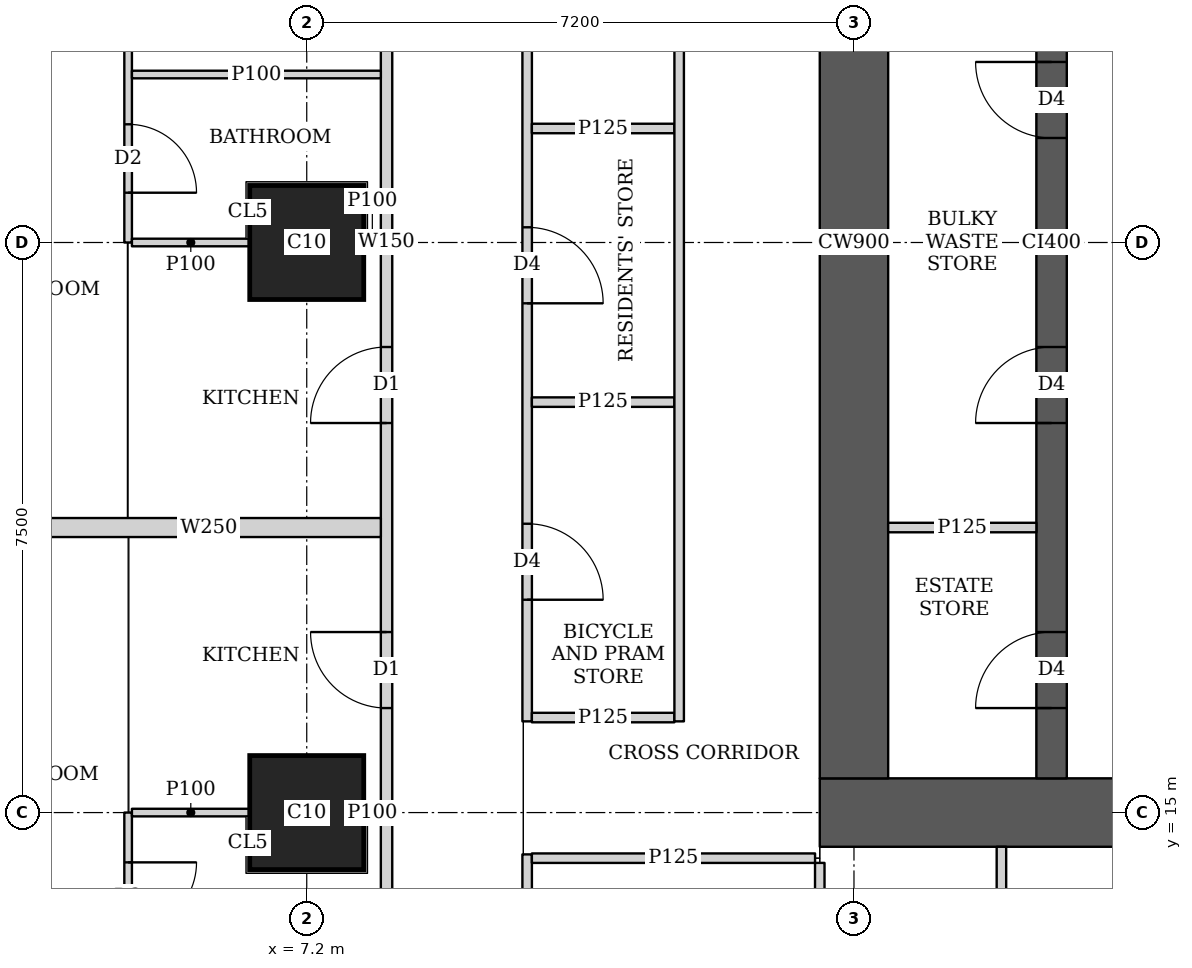
"""IFC4 building model, lengths in metres.
Left out: names, types, materials, properties, quantities, classifications, styles, units other than length and angle.
Written with IfcOpenShell. Run it as: python <this file> out.ifc"""

import sys

from ifc_helpers import new_model, si_unit, direction, frame, frame_2d, origin, origin_2d, place, context, subcontext, project, spatial, rectangle, extrude, element, fill, save


model = new_model("IFC4")
c1 = context("Model", 3, precision=1e-05, world=origin(), true_north=direction((0.0, 1.0)))
c2 = subcontext(c1, "Body", "Model", "MODEL_VIEW")
j1 = project(units=[si_unit("LENGTHUNIT", "METRE"), si_unit("PLANEANGLEUNIT", "RADIAN")], contexts=[c1])
p1 = place(None, origin())
s1 = spatial("IfcSite", under=j1, at=p1, CompositionType="ELEMENT")
p2 = place(p1, origin())
s2 = spatial("IfcBuilding", under=s1, at=p2, CompositionType="ELEMENT")
p3 = place(p2, frame((0.0, 0.0, 147.05)))
s3 = spatial("IfcBuildingStorey", under=s2, at=p3, CompositionType="ELEMENT", Elevation=147.05)
for number, where, z_axis, x_axis in (
    (1, (7.2, 15.0, 0.0), (0.0, 0.0, 1.0), (1.0, 0.0, 0.0)),
    (2, (7.2, 22.5, 0.0), (0.0, 0.0, 1.0), (1.0, 0.0, 0.0)),
):
    element("IfcColumn", number, at=place(p3, frame(where, z_axis=z_axis, x_axis=x_axis)), inside=s3, PredefinedType="COLUMN", context=c2, shape_type="SweptSolid", body=[
        extrude(rectangle(XDim=1.5, YDim=1.5, at=origin_2d()), origin(), (0.0, 0.0, 1.0), 3.75),
    ])
p4 = place(p3, frame((13.95, 15.0, 0.0), z_axis=(0.0, 0.0, 1.0), x_axis=(1.0, 0.0, 0.0)))
e3 = element("IfcWall", 3, at=p4, inside=s3, PredefinedType="SHEAR", context=c2, shape_type="SweptSolid", body=[
    extrude(rectangle(XDim=15.3, YDim=0.9, at=frame_2d((7.65, 0.0))), origin(), (0.0, 0.0, 1.0), 3.75),
])
p5 = place(p4, frame((4.45, 0.0, 0.0)))
e4 = element("IfcOpeningElement", 4, at=p5, cuts=e3, PredefinedType="OPENING", context=c2, shape_type="SweptSolid", body=[
    extrude(rectangle(XDim=1.8, YDim=2.1, at=frame_2d((0.9, 1.05))), frame((0.0, 0.46, 0.0), z_axis=(0.0, -1.0, 0.0), x_axis=(1.0, 0.0, 0.0)), (0.0, 0.0, 1.0), 0.92),
])
p6 = place(p4, frame((10.7, 0.0, 0.0)))
e5 = element("IfcOpeningElement", 5, at=p6, cuts=e3, PredefinedType="OPENING", context=c2, shape_type="SweptSolid", body=[
    extrude(rectangle(XDim=1.1, YDim=2.1, at=frame_2d((0.55, 1.05))), frame((0.0, 0.46, 0.0), z_axis=(0.0, -1.0, 0.0), x_axis=(1.0, 0.0, 0.0)), (0.0, 0.0, 1.0), 0.92),
])
p7 = place(p3, frame((14.4, 15.45, 0.0), z_axis=(0.0, 0.0, 1.0), x_axis=(0.0, 1.0, 0.0)))
e6 = element("IfcWall", 6, at=p7, inside=s3, PredefinedType="SHEAR", context=c2, shape_type="SweptSolid", body=[
    extrude(rectangle(XDim=14.1, YDim=0.9, at=frame_2d((7.05, 0.0))), origin(), (0.0, 0.0, 1.0), 3.75),
])
p8 = place(p3, frame((17.0, 15.45, 0.0), z_axis=(0.0, 0.0, 1.0), x_axis=(0.0, 1.0, 0.0)))
e7 = element("IfcWall", 7, at=p8, inside=s3, PredefinedType="SHEAR", context=c2, shape_type="SweptSolid", body=[
    extrude(rectangle(XDim=14.1, YDim=0.4, at=frame_2d((7.05, 0.0))), origin(), (0.0, 0.0, 1.0), 3.75),
])
p9 = place(p8, frame((0.925, 0.0, 0.0)))
e8 = element("IfcOpeningElement", 8, at=p9, cuts=e7, PredefinedType="OPENING", context=c2, shape_type="SweptSolid", body=[
    extrude(rectangle(XDim=1.0, YDim=2.1, at=frame_2d((0.5, 1.05))), frame((0.0, 0.21, 0.0), z_axis=(0.0, -1.0, 0.0), x_axis=(1.0, 0.0, 0.0)), (0.0, 0.0, 1.0), 0.42),
])
p10 = place(p8, frame((4.675, 0.0, 0.0)))
e9 = element("IfcOpeningElement", 9, at=p10, cuts=e7, PredefinedType="OPENING", context=c2, shape_type="SweptSolid", body=[
    extrude(rectangle(XDim=1.0, YDim=2.1, at=frame_2d((0.5, 1.05))), frame((0.0, 0.21, 0.0), z_axis=(0.0, -1.0, 0.0), x_axis=(1.0, 0.0, 0.0)), (0.0, 0.0, 1.0), 0.42),
])
p11 = place(p8, frame((8.425, 0.0, 0.0)))
e10 = element("IfcOpeningElement", 10, at=p11, cuts=e7, PredefinedType="OPENING", context=c2, shape_type="SweptSolid", body=[
    extrude(rectangle(XDim=1.0, YDim=2.1, at=frame_2d((0.5, 1.05))), frame((0.0, 0.21, 0.0), z_axis=(0.0, -1.0, 0.0), x_axis=(1.0, 0.0, 0.0)), (0.0, 0.0, 1.0), 0.42),
])
p12 = place(p8, frame((12.175, 0.0, 0.0)))
e11 = element("IfcOpeningElement", 11, at=p12, cuts=e7, PredefinedType="OPENING", context=c2, shape_type="SweptSolid", body=[
    extrude(rectangle(XDim=1.0, YDim=2.1, at=frame_2d((0.5, 1.05))), frame((0.0, 0.21, 0.0), z_axis=(0.0, -1.0, 0.0), x_axis=(1.0, 0.0, 0.0)), (0.0, 0.0, 1.0), 0.42),
])
p13 = place(p3, frame((8.25, 1.957, 0.0), z_axis=(0.0, 0.0, 1.0), x_axis=(0.0, 1.0, 0.0)))
e12 = element("IfcWall", 12, at=p13, inside=s3, PredefinedType="SOLIDWALL", context=c2, shape_type="SweptSolid", body=[
    extrude(rectangle(XDim=41.111, YDim=0.15, at=frame_2d((20.556, 0.0))), origin(), (0.0, 0.0, 1.0), 3.5),
])
p14 = place(p13, frame((14.418, 0.0, 0.0)))
e13 = element("IfcOpeningElement", 13, at=p14, cuts=e12, PredefinedType="OPENING", context=c2, shape_type="SweptSolid", body=[
    extrude(rectangle(XDim=1.0, YDim=2.1, at=frame_2d((0.5, 1.05))), frame((0.0, 0.085, 0.0), z_axis=(0.0, -1.0, 0.0), x_axis=(1.0, 0.0, 0.0)), (0.0, 0.0, 1.0), 0.17),
])
p15 = place(p13, frame((18.168, 0.0, 0.0)))
e14 = element("IfcOpeningElement", 14, at=p15, cuts=e12, PredefinedType="OPENING", context=c2, shape_type="SweptSolid", body=[
    extrude(rectangle(XDim=1.0, YDim=2.1, at=frame_2d((0.5, 1.05))), frame((0.0, 0.085, 0.0), z_axis=(0.0, -1.0, 0.0), x_axis=(1.0, 0.0, 0.0)), (0.0, 0.0, 1.0), 0.17),
])
p16 = place(p13, frame((33.168, 0.0, 0.0)))
e15 = element("IfcOpeningElement", 15, at=p16, cuts=e12, PredefinedType="OPENING", context=c2, shape_type="SweptSolid", body=[
    extrude(rectangle(XDim=1.0, YDim=2.1, at=frame_2d((0.5, 1.05))), frame((0.0, 0.085, 0.0), z_axis=(0.0, -1.0, 0.0), x_axis=(1.0, 0.0, 0.0)), (0.0, 0.0, 1.0), 0.17),
])
p17 = place(p3, frame((4.85, 2.505, 0.0), z_axis=(0.0, 0.0, 1.0), x_axis=(0.0, 1.0, 0.0)))
e16 = element("IfcWall", 16, at=p17, inside=s3, PredefinedType="PARTITIONING", context=c2, shape_type="SweptSolid", body=[
    extrude(rectangle(XDim=12.495, YDim=0.1, at=frame_2d((6.248, 0.0))), origin(), (0.0, 0.0, 1.0), 3.5),
])
p18 = place(p17, frame((10.94, 0.0, 0.0)))
e17 = element("IfcOpeningElement", 17, at=p18, cuts=e16, PredefinedType="OPENING", context=c2, shape_type="SweptSolid", body=[
    extrude(rectangle(XDim=0.9, YDim=2.1, at=frame_2d((0.45, 1.05))), frame((0.0, 0.06, 0.0), z_axis=(0.0, -1.0, 0.0), x_axis=(1.0, 0.0, 0.0)), (0.0, 0.0, 1.0), 0.12),
])
p19 = place(p17, frame((7.495, 0.0, 0.0)))
e18 = element("IfcOpeningElement", 18, at=p19, cuts=e16, PredefinedType="OPENING", context=c2, shape_type="SweptSolid", body=[
    extrude(rectangle(XDim=0.9, YDim=2.1, at=frame_2d((0.45, 1.05))), frame((0.0, 0.06, 0.0), z_axis=(0.0, -1.0, 0.0), x_axis=(1.0, 0.0, 0.0)), (0.0, 0.0, 1.0), 0.12),
])
p20 = place(p17, frame((3.635, 0.0, 0.0)))
e19 = element("IfcOpeningElement", 19, at=p20, cuts=e16, PredefinedType="OPENING", context=c2, shape_type="SweptSolid", body=[
    extrude(rectangle(XDim=0.9, YDim=2.1, at=frame_2d((0.45, 1.05))), frame((0.0, 0.06, 0.0), z_axis=(0.0, -1.0, 0.0), x_axis=(1.0, 0.0, 0.0)), (0.0, 0.0, 1.0), 0.12),
])
p21 = place(p17, frame((9.065, 0.0, 0.0)))
e20 = element("IfcOpeningElement", 20, at=p21, cuts=e16, PredefinedType="OPENING", context=c2, shape_type="SweptSolid", body=[
    extrude(rectangle(XDim=0.9, YDim=2.1, at=frame_2d((0.45, 1.05))), frame((0.0, 0.06, 0.0), z_axis=(0.0, -1.0, 0.0), x_axis=(1.0, 0.0, 0.0)), (0.0, 0.0, 1.0), 0.12),
])
p22 = place(p17, frame((5.62, 0.0, 0.0)))
e21 = element("IfcOpeningElement", 21, at=p22, cuts=e16, PredefinedType="OPENING", context=c2, shape_type="SweptSolid", body=[
    extrude(rectangle(XDim=0.9, YDim=2.1, at=frame_2d((0.45, 1.05))), frame((0.0, 0.06, 0.0), z_axis=(0.0, -1.0, 0.0), x_axis=(1.0, 0.0, 0.0)), (0.0, 0.0, 1.0), 0.12),
])
p23 = place(p17, frame((1.76, 0.0, 0.0)))
e22 = element("IfcOpeningElement", 22, at=p23, cuts=e16, PredefinedType="OPENING", context=c2, shape_type="SweptSolid", body=[
    extrude(rectangle(XDim=0.9, YDim=2.1, at=frame_2d((0.45, 1.05))), frame((0.0, 0.06, 0.0), z_axis=(0.0, -1.0, 0.0), x_axis=(1.0, 0.0, 0.0)), (0.0, 0.0, 1.0), 0.12),
])
p24 = place(p3, frame((4.9, 15.0, 0.0), z_axis=(0.0, 0.0, 1.0), x_axis=(1.0, 0.0, 0.0)))
e23 = element("IfcWall", 23, at=p24, inside=s3, PredefinedType="PARTITIONING", context=c2, shape_type="SweptSolid", body=[
    extrude(rectangle(XDim=1.549, YDim=0.1, at=frame_2d((0.774, 0.0))), origin(), (0.0, 0.0, 1.0), 3.5),
])
p25 = place(p3, frame((7.951, 15.0, 0.0), z_axis=(0.0, 0.0, 1.0), x_axis=(1.0, 0.0, 0.0)))
e24 = element("IfcWall", 24, at=p25, inside=s3, PredefinedType="PARTITIONING", context=c2, shape_type="SweptSolid", body=[
    extrude(rectangle(XDim=0.224, YDim=0.1, at=frame_2d((0.112, 0.0))), origin(), (0.0, 0.0, 1.0), 3.5),
])
p26 = place(p3, frame((4.85, 22.5, 0.0), z_axis=(0.0, 0.0, 1.0), x_axis=(0.0, 1.0, 0.0)))
e25 = element("IfcWall", 25, at=p26, inside=s3, PredefinedType="PARTITIONING", context=c2, shape_type="SweptSolid", body=[
    extrude(rectangle(XDim=11.125, YDim=0.1, at=frame_2d((5.562, 0.0))), origin(), (0.0, 0.0, 1.0), 3.5),
])
p27 = place(p26, frame((0.655, 0.0, 0.0)))
e26 = element("IfcOpeningElement", 26, at=p27, cuts=e25, PredefinedType="OPENING", context=c2, shape_type="SweptSolid", body=[
    extrude(rectangle(XDim=0.9, YDim=2.1, at=frame_2d((0.45, 1.05))), frame((0.0, 0.06, 0.0), z_axis=(0.0, -1.0, 0.0), x_axis=(1.0, 0.0, 0.0)), (0.0, 0.0, 1.0), 0.12),
])
p28 = place(p26, frame((4.1, 0.0, 0.0)))
e27 = element("IfcOpeningElement", 27, at=p28, cuts=e25, PredefinedType="OPENING", context=c2, shape_type="SweptSolid", body=[
    extrude(rectangle(XDim=0.9, YDim=2.1, at=frame_2d((0.45, 1.05))), frame((0.0, 0.06, 0.0), z_axis=(0.0, -1.0, 0.0), x_axis=(1.0, 0.0, 0.0)), (0.0, 0.0, 1.0), 0.12),
])
p29 = place(p26, frame((7.96, 0.0, 0.0)))
e28 = element("IfcOpeningElement", 28, at=p29, cuts=e25, PredefinedType="OPENING", context=c2, shape_type="SweptSolid", body=[
    extrude(rectangle(XDim=0.9, YDim=2.1, at=frame_2d((0.45, 1.05))), frame((0.0, 0.06, 0.0), z_axis=(0.0, -1.0, 0.0), x_axis=(1.0, 0.0, 0.0)), (0.0, 0.0, 1.0), 0.12),
])
p30 = place(p26, frame((2.53, 0.0, 0.0)))
e29 = element("IfcOpeningElement", 29, at=p30, cuts=e25, PredefinedType="OPENING", context=c2, shape_type="SweptSolid", body=[
    extrude(rectangle(XDim=0.9, YDim=2.1, at=frame_2d((0.45, 1.05))), frame((0.0, 0.06, 0.0), z_axis=(0.0, -1.0, 0.0), x_axis=(1.0, 0.0, 0.0)), (0.0, 0.0, 1.0), 0.12),
])
p31 = place(p26, frame((5.975, 0.0, 0.0)))
e30 = element("IfcOpeningElement", 30, at=p31, cuts=e25, PredefinedType="OPENING", context=c2, shape_type="SweptSolid", body=[
    extrude(rectangle(XDim=0.9, YDim=2.1, at=frame_2d((0.45, 1.05))), frame((0.0, 0.06, 0.0), z_axis=(0.0, -1.0, 0.0), x_axis=(1.0, 0.0, 0.0)), (0.0, 0.0, 1.0), 0.12),
])
p32 = place(p26, frame((9.835, 0.0, 0.0)))
e31 = element("IfcOpeningElement", 31, at=p32, cuts=e25, PredefinedType="OPENING", context=c2, shape_type="SweptSolid", body=[
    extrude(rectangle(XDim=0.9, YDim=2.1, at=frame_2d((0.45, 1.05))), frame((0.0, 0.06, 0.0), z_axis=(0.0, -1.0, 0.0), x_axis=(1.0, 0.0, 0.0)), (0.0, 0.0, 1.0), 0.12),
])
p33 = place(p3, frame((4.9, 22.5, 0.0), z_axis=(0.0, 0.0, 1.0), x_axis=(1.0, 0.0, 0.0)))
e32 = element("IfcWall", 32, at=p33, inside=s3, PredefinedType="PARTITIONING", context=c2, shape_type="SweptSolid", body=[
    extrude(rectangle(XDim=1.549, YDim=0.1, at=frame_2d((0.774, 0.0))), origin(), (0.0, 0.0, 1.0), 3.5),
])
p34 = place(p3, frame((7.951, 22.5, 0.0), z_axis=(0.0, 0.0, 1.0), x_axis=(1.0, 0.0, 0.0)))
e33 = element("IfcWall", 33, at=p34, inside=s3, PredefinedType="PARTITIONING", context=c2, shape_type="SweptSolid", body=[
    extrude(rectangle(XDim=0.224, YDim=0.1, at=frame_2d((0.112, 0.0))), origin(), (0.0, 0.0, 1.0), 3.5),
])
p35 = place(p3, frame((4.9, 24.71, 0.0), z_axis=(0.0, 0.0, 1.0), x_axis=(1.0, 0.0, 0.0)))
e34 = element("IfcWall", 34, at=p35, inside=s3, PredefinedType="PARTITIONING", context=c2, shape_type="SweptSolid", body=[
    extrude(rectangle(XDim=3.275, YDim=0.1, at=frame_2d((1.638, 0.0))), origin(), (0.0, 0.0, 1.0), 3.5),
])
p36 = place(p3, frame((3.65, 18.75, 0.0), z_axis=(0.0, 0.0, 1.0), x_axis=(1.0, 0.0, 0.0)))
e35 = element("IfcWall", 35, at=p36, inside=s3, PredefinedType="SOLIDWALL", context=c2, shape_type="SweptSolid", body=[
    extrude(rectangle(XDim=4.525, YDim=0.25, at=frame_2d((2.263, 0.0))), origin(), (0.0, 0.0, 1.0), 3.5),
])
p37 = place(p3, frame((10.1, 10.162, 0.0), z_axis=(0.0, 0.0, 1.0), x_axis=(0.0, 1.0, 0.0)))
e36 = element("IfcWall", 36, at=p37, inside=s3, PredefinedType="PARTITIONING", context=c2, shape_type="SweptSolid", body=[
    extrude(rectangle(XDim=4.288, YDim=0.125, at=frame_2d((2.144, 0.0))), origin(), (0.0, 0.0, 1.0), 3.5),
])
p38 = place(p37, frame((1.563, 0.0, 0.0)))
e37 = element("IfcOpeningElement", 37, at=p38, cuts=e36, PredefinedType="OPENING", context=c2, shape_type="SweptSolid", body=[
    extrude(rectangle(XDim=1.0, YDim=2.1, at=frame_2d((0.5, 1.05))), frame((0.0, 0.073, 0.0), z_axis=(0.0, -1.0, 0.0), x_axis=(1.0, 0.0, 0.0)), (0.0, 0.0, 1.0), 0.145),
])
p39 = place(p3, frame((10.1, 16.2, 0.0), z_axis=(0.0, 0.0, 1.0), x_axis=(0.0, 1.0, 0.0)))
e38 = element("IfcWall", 38, at=p39, inside=s3, PredefinedType="PARTITIONING", context=c2, shape_type="SweptSolid", body=[
    extrude(rectangle(XDim=18.638, YDim=0.125, at=frame_2d((9.319, 0.0))), origin(), (0.0, 0.0, 1.0), 3.5),
])
p40 = place(p39, frame((1.6, 0.0, 0.0)))
e39 = element("IfcOpeningElement", 39, at=p40, cuts=e38, PredefinedType="OPENING", context=c2, shape_type="SweptSolid", body=[
    extrude(rectangle(XDim=1.0, YDim=2.1, at=frame_2d((0.5, 1.05))), frame((0.0, 0.073, 0.0), z_axis=(0.0, -1.0, 0.0), x_axis=(1.0, 0.0, 0.0)), (0.0, 0.0, 1.0), 0.145),
])
p41 = place(p39, frame((5.5, 0.0, 0.0)))
e40 = element("IfcOpeningElement", 40, at=p41, cuts=e38, PredefinedType="OPENING", context=c2, shape_type="SweptSolid", body=[
    extrude(rectangle(XDim=1.0, YDim=2.1, at=frame_2d((0.5, 1.05))), frame((0.0, 0.073, 0.0), z_axis=(0.0, -1.0, 0.0), x_axis=(1.0, 0.0, 0.0)), (0.0, 0.0, 1.0), 0.145),
])
p42 = place(p39, frame((12.775, 0.0, 0.0)))
e41 = element("IfcOpeningElement", 41, at=p42, cuts=e38, PredefinedType="OPENING", context=c2, shape_type="SweptSolid", body=[
    extrude(rectangle(XDim=1.0, YDim=2.1, at=frame_2d((0.5, 1.05))), frame((0.0, 0.073, 0.0), z_axis=(0.0, -1.0, 0.0), x_axis=(1.0, 0.0, 0.0)), (0.0, 0.0, 1.0), 0.145),
])
p43 = place(p3, frame((10.162, 14.4, 0.0), z_axis=(0.0, 0.0, 1.0), x_axis=(1.0, 0.0, 0.0)))
e42 = element("IfcWall", 42, at=p43, inside=s3, PredefinedType="PARTITIONING", context=c2, shape_type="SweptSolid", body=[
    extrude(rectangle(XDim=3.726, YDim=0.125, at=frame_2d((1.863, 0.0))), origin(), (0.0, 0.0, 1.0), 3.5),
])
for number, where, z_axis, x_axis in (
    (43, (10.162, 20.4, 0.0), (0.0, 0.0, 1.0), (1.0, 0.0, 0.0)),
    (44, (10.162, 24.0, 0.0), (0.0, 0.0, 1.0), (1.0, 0.0, 0.0)),
):
    element("IfcWall", number, at=place(p3, frame(where, z_axis=z_axis, x_axis=x_axis)), inside=s3, PredefinedType="PARTITIONING", context=c2, shape_type="SweptSolid", body=[
        extrude(rectangle(XDim=1.875, YDim=0.125, at=frame_2d((0.938, 0.0))), origin(), (0.0, 0.0, 1.0), 3.5),
    ])
p44 = place(p3, frame((12.1, 16.2, 0.0), z_axis=(0.0, 0.0, 1.0), x_axis=(0.0, 1.0, 0.0)))
e45 = element("IfcWall", 45, at=p44, inside=s3, PredefinedType="PARTITIONING", context=c2, shape_type="SweptSolid", body=[
    extrude(rectangle(XDim=18.637, YDim=0.125, at=frame_2d((9.318, 0.0))), origin(), (0.0, 0.0, 1.0), 3.5),
])
p45 = place(p3, frame((10.162, 16.25, 0.0), z_axis=(0.0, 0.0, 1.0), x_axis=(1.0, 0.0, 0.0)))
e46 = element("IfcWall", 46, at=p45, inside=s3, PredefinedType="PARTITIONING", context=c2, shape_type="SweptSolid", body=[
    extrude(rectangle(XDim=1.875, YDim=0.125, at=frame_2d((0.938, 0.0))), origin(), (0.0, 0.0, 1.0), 3.5),
])
p46 = place(p3, frame((13.95, 10.163, 0.0), z_axis=(0.0, 0.0, 1.0), x_axis=(0.0, 1.0, 0.0)))
e47 = element("IfcWall", 47, at=p46, inside=s3, PredefinedType="PARTITIONING", context=c2, shape_type="SweptSolid", body=[
    extrude(rectangle(XDim=4.175, YDim=0.125, at=frame_2d((2.087, 0.0))), origin(), (0.0, 0.0, 1.0), 3.5),
])
p47 = place(p3, frame((16.34, 10.163, 0.0), z_axis=(0.0, 0.0, 1.0), x_axis=(0.0, 1.0, 0.0)))
e48 = element("IfcWall", 48, at=p47, inside=s3, PredefinedType="PARTITIONING", context=c2, shape_type="SweptSolid", body=[
    extrude(rectangle(XDim=4.387, YDim=0.125, at=frame_2d((2.193, 0.0))), origin(), (0.0, 0.0, 1.0), 3.5),
])
p48 = place(p47, frame((1.637, 0.0, 0.0)))
e49 = element("IfcOpeningElement", 49, at=p48, cuts=e48, PredefinedType="OPENING", context=c2, shape_type="SweptSolid", body=[
    extrude(rectangle(XDim=1.0, YDim=2.1, at=frame_2d((0.5, 1.05))), frame((0.0, 0.073, 0.0), z_axis=(0.0, -1.0, 0.0), x_axis=(1.0, 0.0, 0.0)), (0.0, 0.0, 1.0), 0.145),
])
p49 = place(p3, frame((14.85, 18.75, 0.0), z_axis=(0.0, 0.0, 1.0), x_axis=(1.0, 0.0, 0.0)))
e50 = element("IfcWall", 50, at=p49, inside=s3, PredefinedType="PARTITIONING", context=c2, shape_type="SweptSolid", body=[
    extrude(rectangle(XDim=1.95, YDim=0.125, at=frame_2d((0.975, 0.0))), origin(), (0.0, 0.0, 1.0), 3.5),
])
p50 = place(p18, origin())
e51 = element("IfcDoor", 51, at=p50, inside=s3, OperationType="SINGLE_SWING_LEFT", PredefinedType="DOOR", context=c2, shape_type="SweptSolid", body=[
    extrude(rectangle(XDim=0.9, YDim=2.1, at=frame_2d((0.45, 1.05))), frame((0.0, 0.025, 0.0), z_axis=(0.0, -1.0, 0.0), x_axis=(1.0, 0.0, 0.0)), (0.0, 0.0, 1.0), 0.05),
])
fill(e17, e51)
p51 = place(p14, origin())
e52 = element("IfcDoor", 52, at=p51, inside=s3, OperationType="SINGLE_SWING_RIGHT", PredefinedType="DOOR", context=c2, shape_type="SweptSolid", body=[
    extrude(rectangle(XDim=1.0, YDim=2.1, at=frame_2d((0.5, 1.05))), frame((0.0, 0.025, 0.0), z_axis=(0.0, -1.0, 0.0), x_axis=(1.0, 0.0, 0.0)), (0.0, 0.0, 1.0), 0.05),
])
fill(e13, e52)
p52 = place(p27, origin())
e53 = element("IfcDoor", 53, at=p52, inside=s3, OperationType="SINGLE_SWING_RIGHT", PredefinedType="DOOR", context=c2, shape_type="SweptSolid", body=[
    extrude(rectangle(XDim=0.9, YDim=2.1, at=frame_2d((0.45, 1.05))), frame((0.0, 0.025, 0.0), z_axis=(0.0, -1.0, 0.0), x_axis=(1.0, 0.0, 0.0)), (0.0, 0.0, 1.0), 0.05),
])
fill(e26, e53)
p53 = place(p15, origin())
e54 = element("IfcDoor", 54, at=p53, inside=s3, OperationType="SINGLE_SWING_LEFT", PredefinedType="DOOR", context=c2, shape_type="SweptSolid", body=[
    extrude(rectangle(XDim=1.0, YDim=2.1, at=frame_2d((0.5, 1.05))), frame((0.0, 0.025, 0.0), z_axis=(0.0, -1.0, 0.0), x_axis=(1.0, 0.0, 0.0)), (0.0, 0.0, 1.0), 0.05),
])
fill(e14, e54)
p54 = place(p40, origin())
e55 = element("IfcDoor", 55, at=p54, inside=s3, OperationType="SINGLE_SWING_RIGHT", PredefinedType="DOOR", context=c2, shape_type="SweptSolid", body=[
    extrude(rectangle(XDim=1.0, YDim=2.1, at=frame_2d((0.5, 1.05))), frame((0.0, 0.025, 0.0), z_axis=(0.0, -1.0, 0.0), x_axis=(1.0, 0.0, 0.0)), (0.0, 0.0, 1.0), 0.05),
])
fill(e39, e55)
p55 = place(p41, origin())
e56 = element("IfcDoor", 56, at=p55, inside=s3, OperationType="SINGLE_SWING_RIGHT", PredefinedType="DOOR", context=c2, shape_type="SweptSolid", body=[
    extrude(rectangle(XDim=1.0, YDim=2.1, at=frame_2d((0.5, 1.05))), frame((0.0, 0.025, 0.0), z_axis=(0.0, -1.0, 0.0), x_axis=(1.0, 0.0, 0.0)), (0.0, 0.0, 1.0), 0.05),
])
fill(e40, e56)
p56 = place(p9, origin())
e57 = element("IfcDoor", 57, at=p56, inside=s3, OperationType="SINGLE_SWING_LEFT", PredefinedType="DOOR", context=c2, shape_type="SweptSolid", body=[
    extrude(rectangle(XDim=1.0, YDim=2.1, at=frame_2d((0.5, 1.05))), frame((0.0, 0.025, 0.0), z_axis=(0.0, -1.0, 0.0), x_axis=(1.0, 0.0, 0.0)), (0.0, 0.0, 1.0), 0.05),
])
fill(e8, e57)
p57 = place(p10, origin())
e58 = element("IfcDoor", 58, at=p57, inside=s3, OperationType="SINGLE_SWING_LEFT", PredefinedType="DOOR", context=c2, shape_type="SweptSolid", body=[
    extrude(rectangle(XDim=1.0, YDim=2.1, at=frame_2d((0.5, 1.05))), frame((0.0, 0.025, 0.0), z_axis=(0.0, -1.0, 0.0), x_axis=(1.0, 0.0, 0.0)), (0.0, 0.0, 1.0), 0.05),
])
fill(e9, e58)
p58 = place(p11, origin())
e59 = element("IfcDoor", 59, at=p58, inside=s3, OperationType="SINGLE_SWING_RIGHT", PredefinedType="DOOR", context=c2, shape_type="SweptSolid", body=[
    extrude(rectangle(XDim=1.0, YDim=2.1, at=frame_2d((0.5, 1.05))), frame((0.0, 0.025, 0.0), z_axis=(0.0, -1.0, 0.0), x_axis=(1.0, 0.0, 0.0)), (0.0, 0.0, 1.0), 0.05),
])
fill(e10, e59)
save(model, sys.argv[1])
